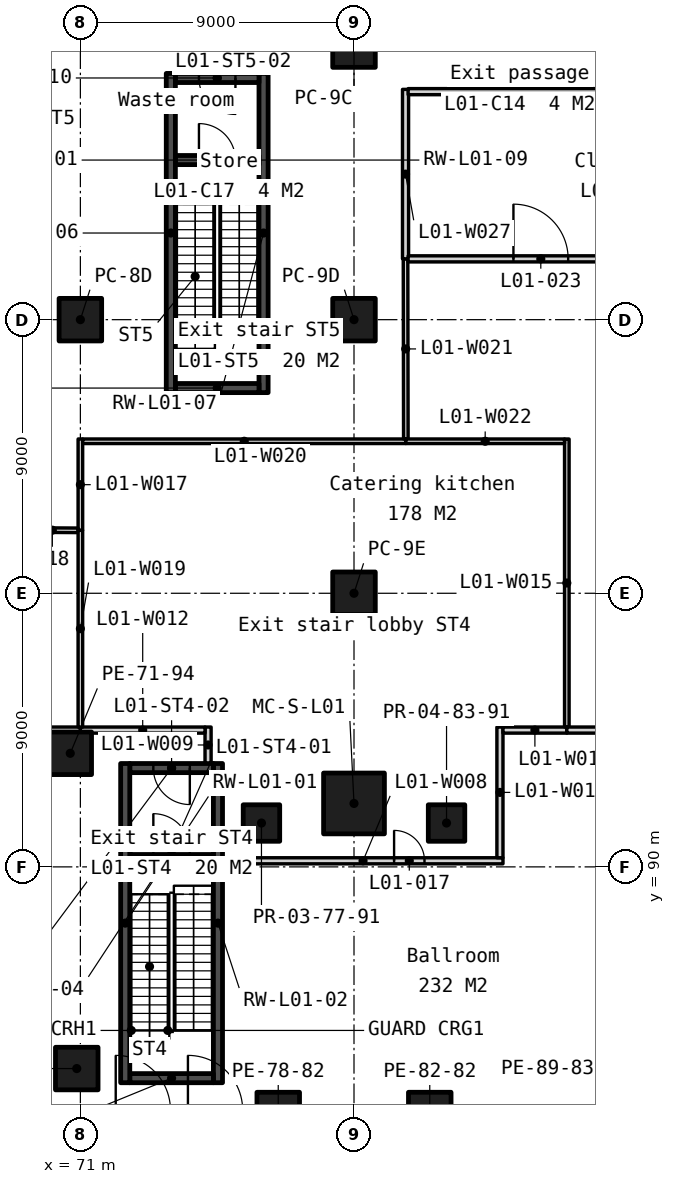
"""IFC4 building model, lengths in metres.
Left out: names, types, materials, properties, quantities, classifications, styles, units other than length and angle.
Written with IfcOpenShell. Run it as: python <this file> out.ifc"""

import sys

from ifc_helpers import new_model, si_unit, direction, frame, frame_2d, origin, origin_2d, place, context, subcontext, project, spatial, rectangle, extrude, element, fill, save


model = new_model("IFC4")
c1 = context("Model", 3, precision=1e-05, world=origin(), true_north=direction((0.0, 1.0)))
c2 = subcontext(c1, "Body", "Model", "MODEL_VIEW")
j1 = project(units=[si_unit("LENGTHUNIT", "METRE"), si_unit("PLANEANGLEUNIT", "RADIAN")], contexts=[c1])
p1 = place(None, origin())
s1 = spatial("IfcSite", under=j1, at=p1, CompositionType="ELEMENT")
p2 = place(p1, origin())
s2 = spatial("IfcBuilding", under=s1, at=p2, CompositionType="ELEMENT")
p3 = place(p2, frame((0.0, 0.0, 7.5)))
s3 = spatial("IfcBuildingStorey", under=s2, at=p3, CompositionType="ELEMENT", Elevation=7.5)
for number, where, z_axis, x_axis in (
    (1, (71.0, 108.0, 0.0), (0.0, 0.0, 1.0), (1.0, 0.0, 0.0)),
    (2, (80.0, 117.0, 0.0), (0.0, 0.0, 1.0), (1.0, 0.0, 0.0)),
    (3, (80.0, 108.0, 0.0), (0.0, 0.0, 1.0), (1.0, 0.0, 0.0)),
    (4, (80.0, 99.0, 0.0), (0.0, 0.0, 1.0), (1.0, 0.0, 0.0)),
    (5, (70.881, 83.366, 0.0), (0.0, 0.0, 1.0), (1.0, 0.0, 0.0)),
    (6, (70.667, 93.736, 0.0), (0.0, 0.0, 1.0), (1.0, 0.0, 0.0)),
    (7, (77.508, 81.886, 0.0), (0.0, 0.0, 1.0), (1.0, 0.0, 0.0)),
    (8, (82.492, 81.886, 0.0), (0.0, 0.0, 1.0), (1.0, 0.0, 0.0)),
):
    element("IfcColumn", number, at=place(p3, frame(where, z_axis=z_axis, x_axis=x_axis)), inside=s3, PredefinedType="COLUMN", context=c2, shape_type="SweptSolid", body=[
        extrude(rectangle(XDim=1.4, YDim=1.4, at=origin_2d()), origin(), (0.0, 0.0, 1.0), 6.0),
    ])
for number, where, z_axis, x_axis in (
    (9, (76.956, 91.442, 0.0), (0.0, 0.0, 1.0), (1.0, 0.0, 0.0)),
    (10, (83.044, 91.442, 0.0), (0.0, 0.0, 1.0), (1.0, 0.0, 0.0)),
):
    element("IfcColumn", number, at=place(p3, frame(where, z_axis=z_axis, x_axis=x_axis)), inside=s3, PredefinedType="COLUMN", context=c2, shape_type="SweptSolid", body=[
        extrude(rectangle(XDim=1.2, YDim=1.2, at=origin_2d()), origin(), (0.0, 0.0, 1.0), 6.0),
    ])
p4 = place(p3, frame((80.0, 92.086, 0.0), z_axis=(0.0, 0.0, 1.0), x_axis=(1.0, 0.0, 0.0)))
e11 = element("IfcColumn", 11, at=p4, inside=s3, PredefinedType="COLUMN", context=c2, shape_type="SweptSolid", body=[
    extrude(rectangle(XDim=2.0, YDim=2.0, at=origin_2d()), origin(), (0.0, 0.0, 1.0), 6.0),
])
for number, where, z_axis, x_axis in (
    (12, (72.475, 82.9, 0.0), (0.0, 0.0, 1.0), (0.0, 1.0, 0.0)),
    (13, (75.525, 82.9, 0.0), (0.0, 0.0, 1.0), (0.0, 1.0, 0.0)),
):
    element("IfcWall", number, at=place(p3, frame(where, z_axis=z_axis, x_axis=x_axis)), inside=s3, PredefinedType="SOLIDWALL", context=c2, shape_type="SweptSolid", body=[
        extrude(rectangle(XDim=10.5, YDim=0.3, at=frame_2d((5.25, 0.0))), origin(), (0.0, 0.0, 1.0), 5.7),
    ])
p5 = place(p3, frame((72.625, 83.05, 0.0), z_axis=(0.0, 0.0, 1.0), x_axis=(1.0, 0.0, 0.0)))
e14 = element("IfcWall", 14, at=p5, inside=s3, PredefinedType="SOLIDWALL", context=c2, shape_type="SweptSolid", body=[
    extrude(rectangle(XDim=2.75, YDim=0.3, at=frame_2d((1.375, 0.0))), origin(), (0.0, 0.0, 1.0), 5.7),
])
p6 = place(p3, frame((72.625, 90.55, 0.0), z_axis=(0.0, 0.0, 1.0), x_axis=(1.0, 0.0, 0.0)))
e15 = element("IfcWall", 15, at=p6, inside=s3, PredefinedType="SOLIDWALL", context=c2, shape_type="SweptSolid", body=[
    extrude(rectangle(XDim=2.75, YDim=0.3, at=frame_2d((1.375, 0.0))), origin(), (0.0, 0.0, 1.0), 5.7),
])
p7 = place(p6, frame((0.775, 0.0, 0.0)))
e16 = element("IfcOpeningElement", 16, at=p7, cuts=e15, PredefinedType="OPENING", context=c2, shape_type="SweptSolid", body=[
    extrude(rectangle(XDim=1.2, YDim=2.1, at=frame_2d((0.6, 1.05))), frame((0.0, 0.16, 0.0), z_axis=(0.0, -1.0, 0.0), x_axis=(1.0, 0.0, 0.0)), (0.0, 0.0, 1.0), 0.32),
])
p8 = place(p3, frame((72.625, 93.25, 0.0), z_axis=(0.0, 0.0, 1.0), x_axis=(1.0, 0.0, 0.0)))
e17 = element("IfcWall", 17, at=p8, inside=s3, PredefinedType="SOLIDWALL", context=c2, shape_type="SweptSolid", body=[
    extrude(rectangle(XDim=2.75, YDim=0.3, at=frame_2d((1.375, 0.0))), origin(), (0.0, 0.0, 1.0), 5.7),
])
p9 = place(p8, frame((0.775, 0.0, 0.0)))
e18 = element("IfcOpeningElement", 18, at=p9, cuts=e17, PredefinedType="OPENING", context=c2, shape_type="SweptSolid", body=[
    extrude(rectangle(XDim=1.2, YDim=2.1, at=frame_2d((0.6, 1.05))), frame((0.0, 0.16, 0.0), z_axis=(0.0, -1.0, 0.0), x_axis=(1.0, 0.0, 0.0)), (0.0, 0.0, 1.0), 0.32),
])
for number, where, z_axis, x_axis in (
    (19, (73.975, 105.6, 0.0), (0.0, 0.0, 1.0), (0.0, 1.0, 0.0)),
    (20, (77.025, 105.6, 0.0), (0.0, 0.0, 1.0), (0.0, 1.0, 0.0)),
):
    element("IfcWall", number, at=place(p3, frame(where, z_axis=z_axis, x_axis=x_axis)), inside=s3, PredefinedType="SOLIDWALL", context=c2, shape_type="SweptSolid", body=[
        extrude(rectangle(XDim=10.5, YDim=0.3, at=frame_2d((5.25, 0.0))), origin(), (0.0, 0.0, 1.0), 5.7),
    ])
p10 = place(p3, frame((74.125, 105.75, 0.0), z_axis=(0.0, 0.0, 1.0), x_axis=(1.0, 0.0, 0.0)))
e21 = element("IfcWall", 21, at=p10, inside=s3, PredefinedType="SOLIDWALL", context=c2, shape_type="SweptSolid", body=[
    extrude(rectangle(XDim=2.75, YDim=0.3, at=frame_2d((1.375, 0.0))), origin(), (0.0, 0.0, 1.0), 5.7),
])
p11 = place(p3, frame((74.125, 113.25, 0.0), z_axis=(0.0, 0.0, 1.0), x_axis=(1.0, 0.0, 0.0)))
e22 = element("IfcWall", 22, at=p11, inside=s3, PredefinedType="SOLIDWALL", context=c2, shape_type="SweptSolid", body=[
    extrude(rectangle(XDim=2.75, YDim=0.3, at=frame_2d((1.375, 0.0))), origin(), (0.0, 0.0, 1.0), 5.7),
])
p12 = place(p11, frame((0.775, 0.0, 0.0)))
e23 = element("IfcOpeningElement", 23, at=p12, cuts=e22, PredefinedType="OPENING", context=c2, shape_type="SweptSolid", body=[
    extrude(rectangle(XDim=1.2, YDim=2.1, at=frame_2d((0.6, 1.05))), frame((0.0, 0.16, 0.0), z_axis=(0.0, -1.0, 0.0), x_axis=(1.0, 0.0, 0.0)), (0.0, 0.0, 1.0), 0.32),
])
p13 = place(p3, frame((74.125, 115.95, 0.0), z_axis=(0.0, 0.0, 1.0), x_axis=(1.0, 0.0, 0.0)))
e24 = element("IfcWall", 24, at=p13, inside=s3, PredefinedType="SOLIDWALL", context=c2, shape_type="SweptSolid", body=[
    extrude(rectangle(XDim=2.75, YDim=0.3, at=frame_2d((1.375, 0.0))), origin(), (0.0, 0.0, 1.0), 5.7),
])
p14 = place(p13, frame((0.775, 0.0, 0.0)))
e25 = element("IfcOpeningElement", 25, at=p14, cuts=e24, PredefinedType="OPENING", context=c2, shape_type="SweptSolid", body=[
    extrude(rectangle(XDim=1.2, YDim=2.1, at=frame_2d((0.6, 1.05))), frame((0.0, 0.16, 0.0), z_axis=(0.0, -1.0, 0.0), x_axis=(1.0, 0.0, 0.0)), (0.0, 0.0, 1.0), 0.32),
])
p15 = place(p3, frame((75.695, 90.2, 0.0), z_axis=(0.0, 0.0, 1.0), x_axis=(1.0, 0.0, 0.0)))
e26 = element("IfcWall", 26, at=p15, inside=s3, PredefinedType="PARTITIONING", context=c2, shape_type="SweptSolid", body=[
    extrude(rectangle(XDim=9.205, YDim=0.2, at=frame_2d((4.603, 0.0))), origin(), (0.0, 0.0, 1.0), 5.7),
])
p16 = place(p15, frame((5.624, 0.0, 0.0)))
e27 = element("IfcOpeningElement", 27, at=p16, cuts=e26, PredefinedType="OPENING", context=c2, shape_type="SweptSolid", body=[
    extrude(rectangle(XDim=1.0, YDim=2.1, at=frame_2d((0.5, 1.05))), frame((0.0, 0.11, 0.0), z_axis=(0.0, -1.0, 0.0), x_axis=(1.0, 0.0, 0.0)), (0.0, 0.0, 1.0), 0.22),
])
p17 = place(p3, frame((75.2, 93.42, 0.0), z_axis=(0.0, 0.0, 1.0), x_axis=(0.0, 1.0, 0.0)))
e28 = element("IfcWall", 28, at=p17, inside=s3, PredefinedType="PARTITIONING", context=c2, shape_type="SweptSolid", body=[
    extrude(rectangle(XDim=1.18, YDim=0.2, at=frame_2d((0.59, 0.0))), origin(), (0.0, 0.0, 1.0), 5.7),
])
p18 = place(p3, frame((66.085, 94.5, 0.0), z_axis=(0.0, 0.0, 1.0), x_axis=(0.999999995065, 9.9344327e-05, 0.0)))
e29 = element("IfcWall", 29, at=p18, inside=s3, PredefinedType="PARTITIONING", context=c2, shape_type="SweptSolid", body=[
    extrude(rectangle(XDim=4.915, YDim=0.2, at=frame_2d((2.458, 0.0))), origin(), (0.0, 0.0, 1.0), 5.7),
])
p19 = place(p18, frame((1.18, 0.0, 0.0)))
e30 = element("IfcOpeningElement", 30, at=p19, cuts=e29, PredefinedType="OPENING", context=c2, shape_type="SweptSolid", body=[
    extrude(rectangle(XDim=1.8, YDim=2.1, at=frame_2d((0.9, 1.05))), frame((0.0, 0.11, 0.0), z_axis=(0.0, -1.0, 0.0), x_axis=(1.0, 0.0, 0.0)), (0.0, 0.0, 1.0), 0.22),
])
p20 = place(p3, frame((71.0, 94.5, 0.0), z_axis=(0.0, 0.0, 1.0), x_axis=(1.0, 0.0, 0.0)))
e31 = element("IfcWall", 31, at=p20, inside=s3, PredefinedType="PARTITIONING", context=c2, shape_type="SweptSolid", body=[
    extrude(rectangle(XDim=4.1, YDim=0.2, at=frame_2d((2.05, 0.0))), origin(), (0.0, 0.0, 1.0), 5.7),
])
p21 = place(p3, frame((84.8, 90.3, 0.0), z_axis=(0.0, 0.0, 1.0), x_axis=(0.0, 1.0, 0.0)))
e32 = element("IfcWall", 32, at=p21, inside=s3, PredefinedType="PARTITIONING", context=c2, shape_type="SweptSolid", body=[
    extrude(rectangle(XDim=4.3, YDim=0.2, at=frame_2d((2.15, 0.0))), origin(), (0.0, 0.0, 1.0), 5.7),
])
p22 = place(p3, frame((84.9, 94.5, 0.0), z_axis=(0.0, 0.0, 1.0), x_axis=(1.0, 0.0, 0.0)))
e33 = element("IfcWall", 33, at=p22, inside=s3, PredefinedType="PARTITIONING", context=c2, shape_type="SweptSolid", body=[
    extrude(rectangle(XDim=2.1, YDim=0.2, at=frame_2d((1.05, 0.0))), origin(), (0.0, 0.0, 1.0), 5.7),
])
p23 = place(p3, frame((87.0, 94.6, 0.0), z_axis=(0.0, 0.0, 1.0), x_axis=(0.0, 1.0, 0.0)))
e34 = element("IfcWall", 34, at=p23, inside=s3, PredefinedType="PARTITIONING", context=c2, shape_type="SweptSolid", body=[
    extrude(rectangle(XDim=9.474, YDim=0.15, at=frame_2d((4.737, 0.0))), origin(), (0.0, 0.0, 1.0), 4.839),
])
p24 = place(p3, frame((87.0, 94.5, 0.0), z_axis=(0.0, 0.0, 1.0), x_axis=(0.999999995065, -9.9344327e-05, 0.0)))
e35 = element("IfcWall", 35, at=p24, inside=s3, PredefinedType="PARTITIONING", context=c2, shape_type="SweptSolid", body=[
    extrude(rectangle(XDim=4.915, YDim=0.2, at=frame_2d((2.458, 0.0))), origin(), (0.0, 0.0, 1.0), 5.7),
])
p25 = place(p3, frame((71.0, 101.07, 0.0), z_axis=(0.0, 0.0, 1.0), x_axis=(0.0, 1.0, 0.0)))
e36 = element("IfcWall", 36, at=p25, inside=s3, PredefinedType="PARTITIONING", context=c2, shape_type="SweptSolid", body=[
    extrude(rectangle(XDim=3.005, YDim=0.15, at=frame_2d((1.502, 0.0))), origin(), (0.0, 0.0, 1.0), 5.7),
])
p26 = place(p3, frame((69.23, 101.08, 0.0), z_axis=(0.0, 0.0, 1.0), x_axis=(0.999983395145, -0.005762762686, 0.0)))
e37 = element("IfcWall", 37, at=p26, inside=s3, PredefinedType="PARTITIONING", context=c2, shape_type="SweptSolid", body=[
    extrude(rectangle(XDim=1.695, YDim=0.15, at=frame_2d((0.847, 0.0))), origin(), (0.0, 0.0, 1.0), 5.7),
])
p27 = place(p3, frame((71.0, 94.6, 0.0), z_axis=(0.0, 0.0, 1.0), x_axis=(0.0, 1.0, 0.0)))
e38 = element("IfcWall", 38, at=p27, inside=s3, PredefinedType="PARTITIONING", context=c2, shape_type="SweptSolid", body=[
    extrude(rectangle(XDim=6.47, YDim=0.15, at=frame_2d((3.235, 0.0))), origin(), (0.0, 0.0, 1.0), 5.7),
])
p28 = place(p3, frame((71.075, 104.0, 0.0), z_axis=(0.0, 0.0, 1.0), x_axis=(1.0, 0.0, 0.0)))
e39 = element("IfcWall", 39, at=p28, inside=s3, PredefinedType="PARTITIONING", context=c2, shape_type="SweptSolid", body=[
    extrude(rectangle(XDim=10.63, YDim=0.15, at=frame_2d((5.315, 0.0))), origin(), (0.0, 0.0, 1.0), 5.7),
])
p29 = place(p3, frame((81.705, 104.075, 0.0), z_axis=(0.0, 0.0, 1.0), x_axis=(-0.00164819093, 0.999998641732, 0.0)))
e40 = element("IfcWall", 40, at=p29, inside=s3, PredefinedType="PARTITIONING", context=c2, shape_type="SweptSolid", body=[
    extrude(rectangle(XDim=5.925, YDim=0.15, at=frame_2d((2.962, 0.0))), origin(), (0.0, 0.0, 1.0), 5.7),
])
p30 = place(p3, frame((81.705, 104.0, 0.0), z_axis=(0.0, 0.0, 1.0), x_axis=(0.999999995625, -9.3540994e-05, 0.0)))
e41 = element("IfcWall", 41, at=p30, inside=s3, PredefinedType="PARTITIONING", context=c2, shape_type="SweptSolid", body=[
    extrude(rectangle(XDim=5.22, YDim=0.15, at=frame_2d((2.61, 0.0))), origin(), (0.0, 0.0, 1.0), 5.7),
])
p31 = place(p3, frame((81.695, 110.0, 0.0), z_axis=(0.0, 0.0, 1.0), x_axis=(0.0, 1.0, 0.0)))
e42 = element("IfcWall", 42, at=p31, inside=s3, PredefinedType="PARTITIONING", context=c2, shape_type="SweptSolid", body=[
    extrude(rectangle(XDim=5.575, YDim=0.2, at=frame_2d((2.788, 0.0))), origin(), (0.0, 0.0, 1.0), 5.7),
])
p32 = place(p3, frame((81.78, 110.0, 0.0), z_axis=(0.0, 0.0, 1.0), x_axis=(1.0, 0.0, 0.0)))
e43 = element("IfcWall", 43, at=p32, inside=s3, PredefinedType="PARTITIONING", context=c2, shape_type="SweptSolid", body=[
    extrude(rectangle(XDim=18.22, YDim=0.2, at=frame_2d((9.11, 0.0))), origin(), (0.0, 0.0, 1.0), 5.7),
])
p33 = place(p32, frame((3.464, 0.0, 0.0)))
e44 = element("IfcOpeningElement", 44, at=p33, cuts=e43, PredefinedType="OPENING", context=c2, shape_type="SweptSolid", body=[
    extrude(rectangle(XDim=1.8, YDim=2.1, at=frame_2d((0.9, 1.05))), frame((0.0, 0.11, 0.0), z_axis=(0.0, -1.0, 0.0), x_axis=(1.0, 0.0, 0.0)), (0.0, 0.0, 1.0), 0.22),
])
p34 = place(p3, frame((81.78, 115.5, 0.0), z_axis=(0.0, 0.0, 1.0), x_axis=(1.0, 0.0, 0.0)))
e45 = element("IfcWall", 45, at=p34, inside=s3, PredefinedType="PARTITIONING", context=c2, shape_type="SweptSolid", body=[
    extrude(rectangle(XDim=18.22, YDim=0.2, at=frame_2d((9.11, 0.0))), origin(), (0.0, 0.0, 1.0), 5.7),
])
p35 = place(p34, frame((8.21, 0.0, 0.0)))
e46 = element("IfcOpeningElement", 46, at=p35, cuts=e45, PredefinedType="OPENING", context=c2, shape_type="SweptSolid", body=[
    extrude(rectangle(XDim=1.8, YDim=2.1, at=frame_2d((0.9, 1.05))), frame((0.0, 0.11, 0.0), z_axis=(0.0, -1.0, 0.0), x_axis=(1.0, 0.0, 0.0)), (0.0, 0.0, 1.0), 0.22),
])
p36 = place(p7, origin())
e47 = element("IfcDoor", 47, at=p36, inside=s3, OperationType="SINGLE_SWING_LEFT", PredefinedType="DOOR", context=c2, shape_type="SweptSolid", body=[
    extrude(rectangle(XDim=1.2, YDim=2.1, at=frame_2d((0.6, 1.05))), frame((0.0, 0.025, 0.0), z_axis=(0.0, -1.0, 0.0), x_axis=(1.0, 0.0, 0.0)), (0.0, 0.0, 1.0), 0.05),
])
fill(e16, e47)
p37 = place(p9, origin())
e48 = element("IfcDoor", 48, at=p37, inside=s3, OperationType="SINGLE_SWING_RIGHT", PredefinedType="DOOR", context=c2, shape_type="SweptSolid", body=[
    extrude(rectangle(XDim=1.2, YDim=2.1, at=frame_2d((0.6, 1.05))), frame((0.0, 0.025, 0.0), z_axis=(0.0, -1.0, 0.0), x_axis=(1.0, 0.0, 0.0)), (0.0, 0.0, 1.0), 0.05),
])
fill(e18, e48)
p38 = place(p12, origin())
e49 = element("IfcDoor", 49, at=p38, inside=s3, OperationType="SINGLE_SWING_LEFT", PredefinedType="DOOR", context=c2, shape_type="SweptSolid", body=[
    extrude(rectangle(XDim=1.2, YDim=2.1, at=frame_2d((0.6, 1.05))), frame((0.0, 0.025, 0.0), z_axis=(0.0, -1.0, 0.0), x_axis=(1.0, 0.0, 0.0)), (0.0, 0.0, 1.0), 0.05),
])
fill(e23, e49)
p39 = place(p14, origin())
e50 = element("IfcDoor", 50, at=p39, inside=s3, OperationType="SINGLE_SWING_RIGHT", PredefinedType="DOOR", context=c2, shape_type="SweptSolid", body=[
    extrude(rectangle(XDim=1.2, YDim=2.1, at=frame_2d((0.6, 1.05))), frame((0.0, 0.025, 0.0), z_axis=(0.0, -1.0, 0.0), x_axis=(1.0, 0.0, 0.0)), (0.0, 0.0, 1.0), 0.05),
])
fill(e25, e50)
p40 = place(p16, origin())
e51 = element("IfcDoor", 51, at=p40, inside=s3, OperationType="SINGLE_SWING_LEFT", PredefinedType="DOOR", context=c2, shape_type="SweptSolid", body=[
    extrude(rectangle(XDim=1.0, YDim=2.1, at=frame_2d((0.5, 1.05))), frame((0.0, 0.025, 0.0), z_axis=(0.0, -1.0, 0.0), x_axis=(1.0, 0.0, 0.0)), (0.0, 0.0, 1.0), 0.05),
])
fill(e27, e51)
p41 = place(p33, origin())
e52 = element("IfcDoor", 52, at=p41, inside=s3, OperationType="SINGLE_SWING_LEFT", PredefinedType="DOOR", context=c2, shape_type="SweptSolid", body=[
    extrude(rectangle(XDim=1.8, YDim=2.1, at=frame_2d((0.9, 1.05))), frame((0.0, 0.025, 0.0), z_axis=(0.0, -1.0, 0.0), x_axis=(1.0, 0.0, 0.0)), (0.0, 0.0, 1.0), 0.05),
])
fill(e44, e52)
save(model, sys.argv[1])
